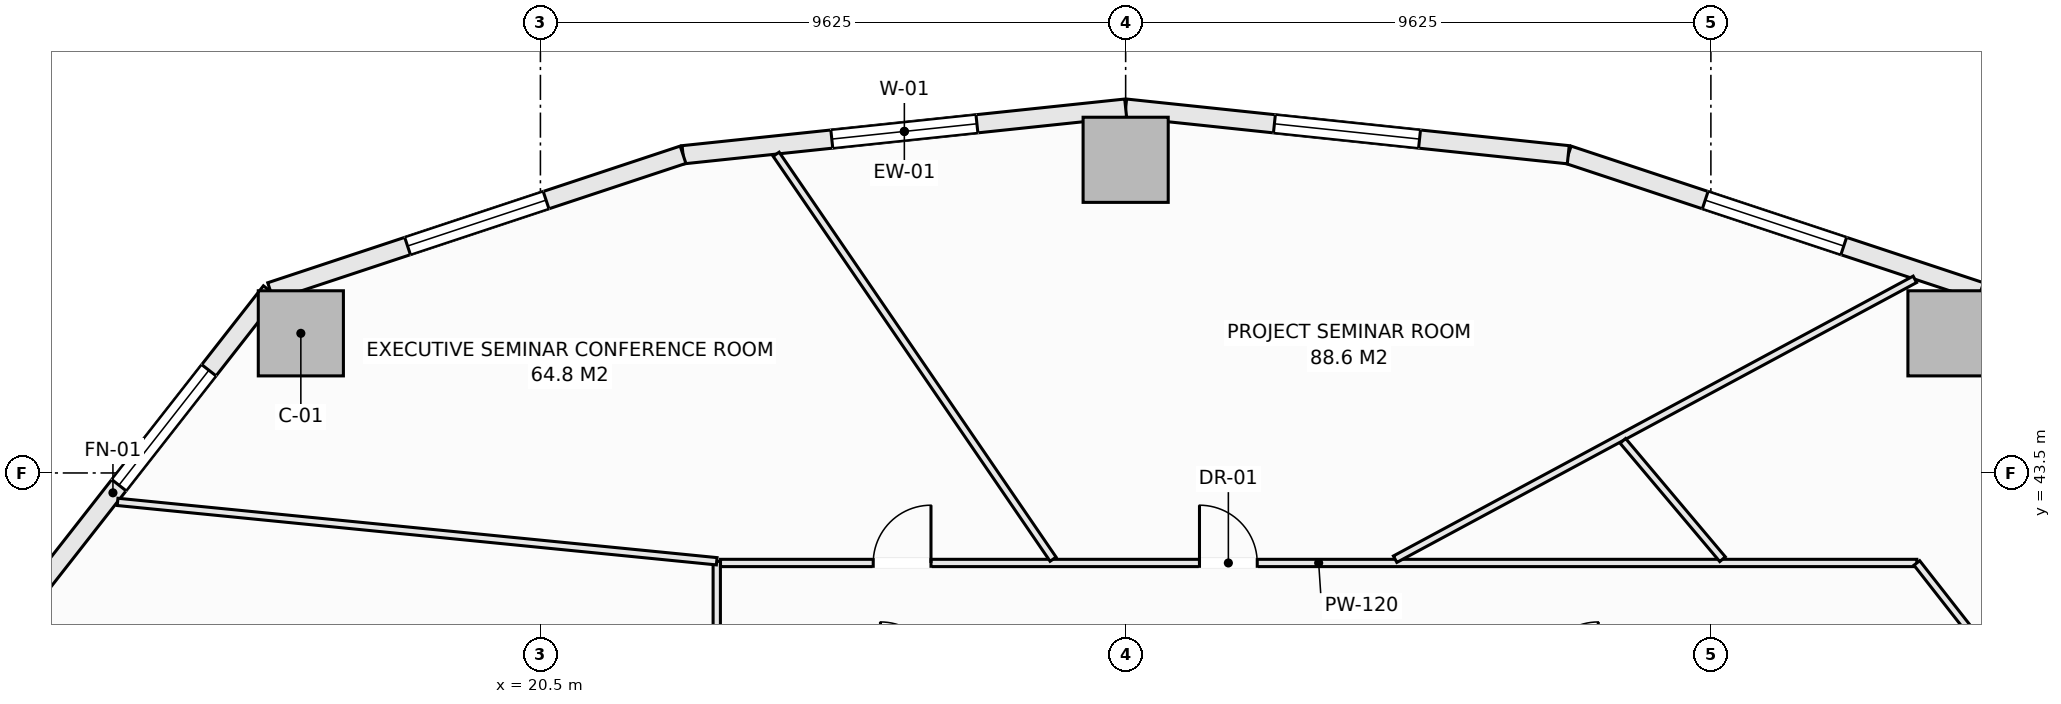
"""IFC4 building model, lengths in metres.
Left out: names, types, materials, properties, quantities, classifications, styles, units other than length and angle.
Written with IfcOpenShell. Run it as: python <this file> out.ifc"""

import sys

from ifc_helpers import new_model, si_unit, direction, frame, frame_2d, origin, origin_2d, place, context, subcontext, project, spatial, rectangle, extrude, element, fill, save


model = new_model("IFC4")
c1 = context("Model", 3, precision=1e-05, world=origin(), true_north=direction((0.0, 1.0)))
c2 = subcontext(c1, "Body", "Model", "MODEL_VIEW")
j1 = project(units=[si_unit("LENGTHUNIT", "METRE"), si_unit("PLANEANGLEUNIT", "RADIAN")], contexts=[c1])
p1 = place(None, origin())
s1 = spatial("IfcSite", under=j1, at=p1, CompositionType="ELEMENT")
p2 = place(p1, origin())
s2 = spatial("IfcBuilding", under=s1, at=p2, CompositionType="ELEMENT")
p3 = place(p2, frame((0.0, 0.0, 34.2)))
s3 = spatial("IfcBuildingStorey", under=s2, at=p3, CompositionType="ELEMENT", Elevation=34.2)
for number, where, z_axis, x_axis in (
    (1, (43.69, 45.796, -0.28), (0.0, 0.0, 1.0), (1.0, 0.0, 0.0)),
    (2, (30.125, 48.65, -0.28), (0.0, 0.0, 1.0), (1.0, 0.0, 0.0)),
    (3, (16.56, 45.796, -0.28), (0.0, 0.0, 1.0), (1.0, 0.0, 0.0)),
):
    element("IfcColumn", number, at=place(p3, frame(where, z_axis=z_axis, x_axis=x_axis)), inside=s3, PredefinedType="COLUMN", context=c2, shape_type="SweptSolid", body=[
        extrude(rectangle(XDim=1.4, YDim=1.4, at=origin_2d()), origin(), (0.0, 0.0, 1.0), 3.85),
    ])
p4 = place(p3, frame((44.188, 46.486, 0.0), z_axis=(0.0, 0.0, 1.0), x_axis=(0.616421309777, -0.787416515482, 0.0)))
e4 = element("IfcWall", 4, at=p4, inside=s3, PredefinedType="SOLIDWALL", context=c2, shape_type="SweptSolid", body=[
    extrude(rectangle(XDim=6.696, YDim=0.3, at=frame_2d((3.348, 0.0))), origin(), (0.0, 0.0, 1.0), 3.093),
])
p5 = place(p4, frame((2.148, 0.0, 0.85)))
e5 = element("IfcOpeningElement", 5, at=p5, cuts=e4, PredefinedType="OPENING", context=c2, shape_type="SweptSolid", body=[
    extrude(rectangle(XDim=2.4, YDim=1.9, at=frame_2d((1.2, 0.95))), frame((0.0, 0.16, 0.0), z_axis=(0.0, -1.0, 0.0), x_axis=(1.0, 0.0, 0.0)), (0.0, 0.0, 1.0), 0.32),
])
p6 = place(p3, frame((37.404, 48.733, 0.0), z_axis=(0.0, 0.0, 1.0), x_axis=(0.949238715533, -0.31455661006, 0.0)))
e6 = element("IfcWall", 6, at=p6, inside=s3, PredefinedType="SOLIDWALL", context=c2, shape_type="SweptSolid", body=[
    extrude(rectangle(XDim=7.146, YDim=0.3, at=frame_2d((3.573, 0.0))), origin(), (0.0, 0.0, 1.0), 3.093),
])
p7 = place(p6, frame((2.373, 0.0, 0.85)))
e7 = element("IfcOpeningElement", 7, at=p7, cuts=e6, PredefinedType="OPENING", context=c2, shape_type="SweptSolid", body=[
    extrude(rectangle(XDim=2.4, YDim=1.9, at=frame_2d((1.2, 0.95))), frame((0.0, 0.16, 0.0), z_axis=(0.0, -1.0, 0.0), x_axis=(1.0, 0.0, 0.0)), (0.0, 0.0, 1.0), 0.32),
])
p8 = place(p3, frame((30.125, 49.5, 0.0), z_axis=(0.0, 0.0, 1.0), x_axis=(0.994500334317, -0.104733399844, 0.0)))
e8 = element("IfcWall", 8, at=p8, inside=s3, PredefinedType="SOLIDWALL", context=c2, shape_type="SweptSolid", body=[
    extrude(rectangle(XDim=7.32, YDim=0.3, at=frame_2d((3.66, 0.0))), origin(), (0.0, 0.0, 1.0), 3.093),
])
p9 = place(p8, frame((2.46, 0.0, 0.85)))
e9 = element("IfcOpeningElement", 9, at=p9, cuts=e8, PredefinedType="OPENING", context=c2, shape_type="SweptSolid", body=[
    extrude(rectangle(XDim=2.4, YDim=1.9, at=frame_2d((1.2, 0.95))), frame((0.0, 0.16, 0.0), z_axis=(0.0, -1.0, 0.0), x_axis=(1.0, 0.0, 0.0)), (0.0, 0.0, 1.0), 0.32),
])
p10 = place(p3, frame((22.846, 48.733, 0.0), z_axis=(0.0, 0.0, 1.0), x_axis=(0.994500334317, 0.104733399844, 0.0)))
e10 = element("IfcWall", 10, at=p10, inside=s3, PredefinedType="SOLIDWALL", context=c2, shape_type="SweptSolid", body=[
    extrude(rectangle(XDim=7.32, YDim=0.3, at=frame_2d((3.66, 0.0))), origin(), (0.0, 0.0, 1.0), 3.093),
])
p11 = place(p10, frame((2.46, 0.0, 0.85)))
e11 = element("IfcOpeningElement", 11, at=p11, cuts=e10, PredefinedType="OPENING", context=c2, shape_type="SweptSolid", body=[
    extrude(rectangle(XDim=2.4, YDim=1.9, at=frame_2d((1.2, 0.95))), frame((0.0, 0.16, 0.0), z_axis=(0.0, -1.0, 0.0), x_axis=(1.0, 0.0, 0.0)), (0.0, 0.0, 1.0), 0.32),
])
p12 = place(p3, frame((16.062, 46.486, 0.0), z_axis=(0.0, 0.0, 1.0), x_axis=(0.949238715533, 0.31455661006, 0.0)))
e12 = element("IfcWall", 12, at=p12, inside=s3, PredefinedType="SOLIDWALL", context=c2, shape_type="SweptSolid", body=[
    extrude(rectangle(XDim=7.146, YDim=0.3, at=frame_2d((3.573, 0.0))), origin(), (0.0, 0.0, 1.0), 3.093),
])
p13 = place(p12, frame((2.373, 0.0, 0.85)))
e13 = element("IfcOpeningElement", 13, at=p13, cuts=e12, PredefinedType="OPENING", context=c2, shape_type="SweptSolid", body=[
    extrude(rectangle(XDim=2.4, YDim=1.9, at=frame_2d((1.2, 0.95))), frame((0.0, 0.16, 0.0), z_axis=(0.0, -1.0, 0.0), x_axis=(1.0, 0.0, 0.0)), (0.0, 0.0, 1.0), 0.32),
])
p14 = place(p3, frame((11.935, 41.213, 0.0), z_axis=(0.0, 0.0, 1.0), x_axis=(0.616421309777, 0.787416515482, 0.0)))
e14 = element("IfcWall", 14, at=p14, inside=s3, PredefinedType="SOLIDWALL", context=c2, shape_type="SweptSolid", body=[
    extrude(rectangle(XDim=6.696, YDim=0.3, at=frame_2d((3.348, 0.0))), origin(), (0.0, 0.0, 1.0), 3.093),
])
p15 = place(p14, frame((2.65, 0.0, 0.85)))
e15 = element("IfcOpeningElement", 15, at=p15, cuts=e14, PredefinedType="OPENING", context=c2, shape_type="SweptSolid", body=[
    extrude(rectangle(XDim=2.4, YDim=1.9, at=frame_2d((1.2, 0.95))), frame((0.0, 0.16, 0.0), z_axis=(0.0, -1.0, 0.0), x_axis=(1.0, 0.0, 0.0)), (0.0, 0.0, 1.0), 0.32),
])
p16 = place(p3, frame((23.4, 40.162, 0.0), z_axis=(0.0, 0.0, 1.0), x_axis=(0.0, 1.0, 0.0)))
e16 = element("IfcWall", 16, at=p16, inside=s3, PredefinedType="PARTITIONING", context=c2, shape_type="SweptSolid", body=[
    extrude(rectangle(XDim=1.886, YDim=0.12, at=frame_2d((0.943, 0.0))), origin(), (0.0, 0.0, 1.0), 3.57),
])
p17 = place(p3, frame((23.462, 42.02, 0.0), z_axis=(0.0, 0.0, 1.0), x_axis=(1.0, 0.0, 0.0)))
e17 = element("IfcWall", 17, at=p17, inside=s3, PredefinedType="PARTITIONING", context=c2, shape_type="SweptSolid", body=[
    extrude(rectangle(XDim=19.675, YDim=0.12, at=frame_2d((9.837, 0.0))), origin(), (0.0, 0.0, 1.0), 3.57),
])
p18 = place(p17, frame((7.877, 0.0, 0.0)))
e18 = element("IfcOpeningElement", 18, at=p18, cuts=e17, PredefinedType="OPENING", context=c2, shape_type="SweptSolid", body=[
    extrude(rectangle(XDim=0.95, YDim=2.1, at=frame_2d((0.475, 1.05))), frame((0.0, 0.07, 0.0), z_axis=(0.0, -1.0, 0.0), x_axis=(1.0, 0.0, 0.0)), (0.0, 0.0, 1.0), 0.14),
])
p19 = place(p17, frame((2.511, 0.0, 0.0)))
e19 = element("IfcOpeningElement", 19, at=p19, cuts=e17, PredefinedType="OPENING", context=c2, shape_type="SweptSolid", body=[
    extrude(rectangle(XDim=0.95, YDim=2.1, at=frame_2d((0.475, 1.05))), frame((0.0, 0.07, 0.0), z_axis=(0.0, -1.0, 0.0), x_axis=(1.0, 0.0, 0.0)), (0.0, 0.0, 1.0), 0.14),
])
p20 = place(p3, frame((43.137, 42.02, 0.0), z_axis=(0.0, 0.0, 1.0), x_axis=(0.616441660183, -0.787400583941, 0.0)))
e20 = element("IfcWall", 20, at=p20, inside=s3, PredefinedType="PARTITIONING", context=c2, shape_type="SweptSolid", body=[
    extrude(rectangle(XDim=5.083, YDim=0.12, at=frame_2d((2.541, 0.0))), origin(), (0.0, 0.0, 1.0), 3.57),
])
p21 = place(p20, frame((3.326, 0.0, 0.0)))
e21 = element("IfcOpeningElement", 21, at=p21, cuts=e20, PredefinedType="OPENING", context=c2, shape_type="SweptSolid", body=[
    extrude(rectangle(XDim=0.95, YDim=2.1, at=frame_2d((0.475, 1.05))), frame((0.0, 0.07, 0.0), z_axis=(0.0, -1.0, 0.0), x_axis=(1.0, 0.0, 0.0)), (0.0, 0.0, 1.0), 0.14),
])
p22 = place(p3, frame((34.557, 42.082, 0.0), z_axis=(0.0, 0.0, 1.0), x_axis=(0.880504205361, 0.474038336362, 0.0)))
e22 = element("IfcWall", 22, at=p22, inside=s3, PredefinedType="PARTITIONING", context=c2, shape_type="SweptSolid", body=[
    extrude(rectangle(XDim=9.708, YDim=0.12, at=frame_2d((4.854, 0.0))), origin(), (0.0, 0.0, 1.0), 3.57),
])
p23 = place(p3, frame((38.302, 44.028, 0.0), z_axis=(0.0, 0.0, 1.0), x_axis=(0.644336623354, -0.764741992965, 0.0)))
e23 = element("IfcWall", 23, at=p23, inside=s3, PredefinedType="PARTITIONING", context=c2, shape_type="SweptSolid", body=[
    extrude(rectangle(XDim=2.545, YDim=0.12, at=frame_2d((1.272, 0.0))), origin(), (0.0, 0.0, 1.0), 3.57),
])
p24 = place(p3, frame((24.377, 48.742, 0.0), z_axis=(0.0, 0.0, 1.0), x_axis=(0.56452118845, -0.825418577323, 0.0)))
e24 = element("IfcWall", 24, at=p24, inside=s3, PredefinedType="PARTITIONING", context=c2, shape_type="SweptSolid", body=[
    extrude(rectangle(XDim=8.068, YDim=0.12, at=frame_2d((4.034, 0.0))), origin(), (0.0, 0.0, 1.0), 3.57),
])
p25 = place(p3, frame((13.546, 43.024, 0.0), z_axis=(0.0, 0.0, 1.0), x_axis=(0.995126865481, -0.098602847817, 0.0)))
e25 = element("IfcWall", 25, at=p25, inside=s3, PredefinedType="PARTITIONING", context=c2, shape_type="SweptSolid", body=[
    extrude(rectangle(XDim=9.902, YDim=0.12, at=frame_2d((4.951, 0.0))), origin(), (0.0, 0.0, 1.0), 3.57),
])
p26 = place(p7, origin())
e26 = element("IfcWindow", 26, at=p26, inside=s3, PartitioningType="SINGLE_PANEL", PredefinedType="WINDOW", context=c2, shape_type="SweptSolid", body=[
    extrude(rectangle(XDim=2.4, YDim=1.9, at=frame_2d((1.2, 0.95))), frame((0.0, 0.03, 0.0), z_axis=(0.0, -1.0, 0.0), x_axis=(1.0, 0.0, 0.0)), (0.0, 0.0, 1.0), 0.06),
])
fill(e7, e26)
p27 = place(p9, origin())
e27 = element("IfcWindow", 27, at=p27, inside=s3, PartitioningType="SINGLE_PANEL", PredefinedType="WINDOW", context=c2, shape_type="SweptSolid", body=[
    extrude(rectangle(XDim=2.4, YDim=1.9, at=frame_2d((1.2, 0.95))), frame((0.0, 0.03, 0.0), z_axis=(0.0, -1.0, 0.0), x_axis=(1.0, 0.0, 0.0)), (0.0, 0.0, 1.0), 0.06),
])
fill(e9, e27)
p28 = place(p11, origin())
e28 = element("IfcWindow", 28, at=p28, inside=s3, PartitioningType="SINGLE_PANEL", PredefinedType="WINDOW", context=c2, shape_type="SweptSolid", body=[
    extrude(rectangle(XDim=2.4, YDim=1.9, at=frame_2d((1.2, 0.95))), frame((0.0, 0.03, 0.0), z_axis=(0.0, -1.0, 0.0), x_axis=(1.0, 0.0, 0.0)), (0.0, 0.0, 1.0), 0.06),
])
fill(e11, e28)
p29 = place(p13, origin())
e29 = element("IfcWindow", 29, at=p29, inside=s3, PartitioningType="SINGLE_PANEL", PredefinedType="WINDOW", context=c2, shape_type="SweptSolid", body=[
    extrude(rectangle(XDim=2.4, YDim=1.9, at=frame_2d((1.2, 0.95))), frame((0.0, 0.03, 0.0), z_axis=(0.0, -1.0, 0.0), x_axis=(1.0, 0.0, 0.0)), (0.0, 0.0, 1.0), 0.06),
])
fill(e13, e29)
p30 = place(p15, origin())
e30 = element("IfcWindow", 30, at=p30, inside=s3, PartitioningType="SINGLE_PANEL", PredefinedType="WINDOW", context=c2, shape_type="SweptSolid", body=[
    extrude(rectangle(XDim=2.4, YDim=1.9, at=frame_2d((1.2, 0.95))), frame((0.0, 0.03, 0.0), z_axis=(0.0, -1.0, 0.0), x_axis=(1.0, 0.0, 0.0)), (0.0, 0.0, 1.0), 0.06),
])
fill(e15, e30)
p31 = place(p18, origin())
e31 = element("IfcDoor", 31, at=p31, inside=s3, OperationType="SINGLE_SWING_LEFT", PredefinedType="DOOR", context=c2, shape_type="SweptSolid", body=[
    extrude(rectangle(XDim=0.95, YDim=2.1, at=frame_2d((0.475, 1.05))), frame((0.0, 0.025, 0.0), z_axis=(0.0, -1.0, 0.0), x_axis=(1.0, 0.0, 0.0)), (0.0, 0.0, 1.0), 0.05),
])
fill(e18, e31)
p32 = place(p19, origin())
e32 = element("IfcDoor", 32, at=p32, inside=s3, OperationType="SINGLE_SWING_RIGHT", PredefinedType="DOOR", context=c2, shape_type="SweptSolid", body=[
    extrude(rectangle(XDim=0.95, YDim=2.1, at=frame_2d((0.475, 1.05))), frame((0.0, 0.025, 0.0), z_axis=(0.0, -1.0, 0.0), x_axis=(1.0, 0.0, 0.0)), (0.0, 0.0, 1.0), 0.05),
])
fill(e19, e32)
save(model, sys.argv[1])
